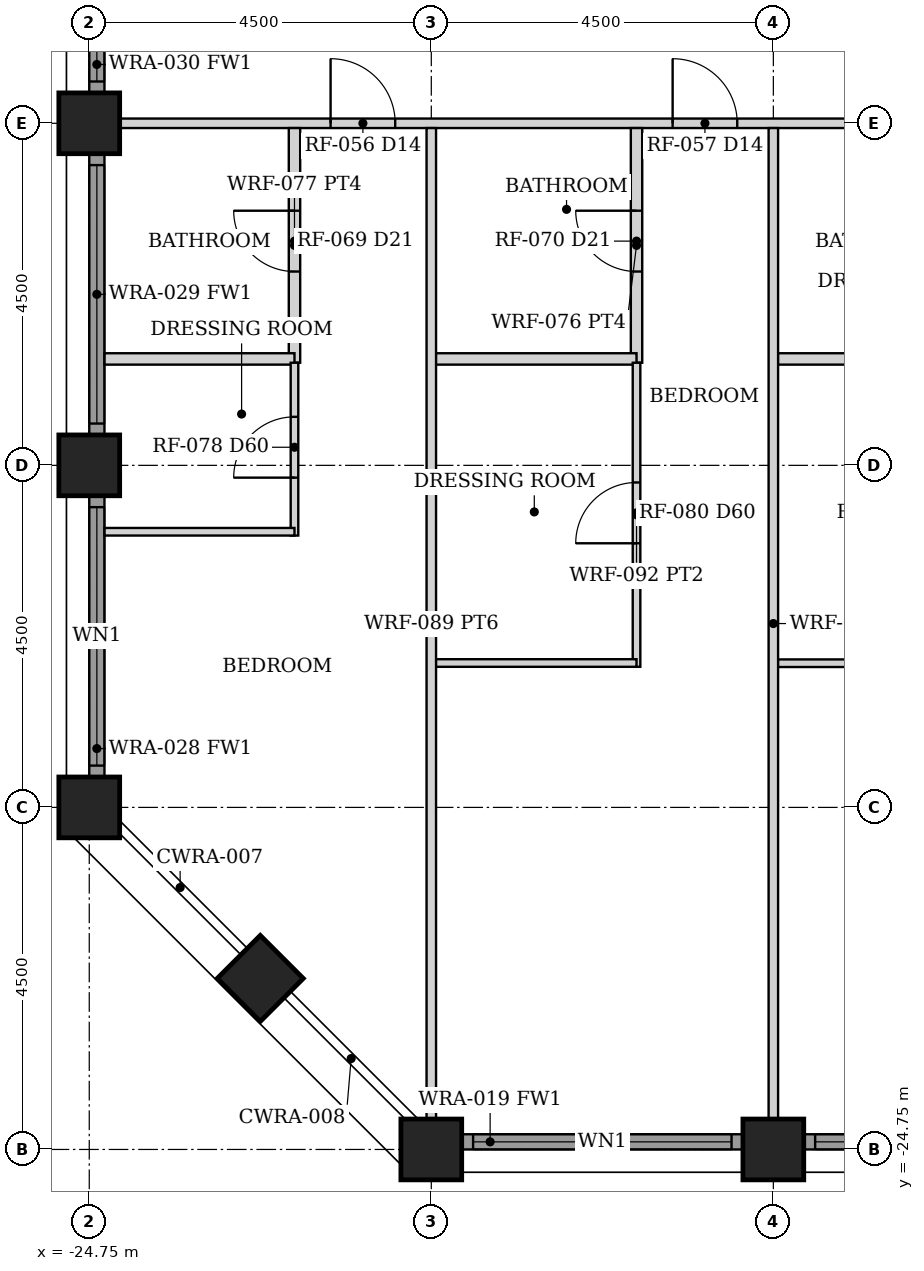
"""IFC4 building model, lengths in metres.
Left out: names, types, materials, properties, quantities, classifications, styles, units other than length and angle.
Written with IfcOpenShell. Run it as: python <this file> out.ifc"""

import sys

from ifc_helpers import new_model, si_unit, direction, frame, frame_2d, origin, origin_2d, place, context, subcontext, project, spatial, rectangle, hollow_rectangle, extrude, element, fill, save


model = new_model("IFC4")
c1 = context("Model", 3, precision=1e-05, world=origin(), true_north=direction((0.0, 1.0)))
c2 = subcontext(c1, "Body", "Model", "MODEL_VIEW")
j1 = project(units=[si_unit("LENGTHUNIT", "METRE"), si_unit("PLANEANGLEUNIT", "RADIAN")], contexts=[c1])
p1 = place(None, origin())
s1 = spatial("IfcSite", under=j1, at=p1, CompositionType="ELEMENT")
p2 = place(p1, origin())
s2 = spatial("IfcBuilding", under=s1, at=p2, CompositionType="ELEMENT")
p3 = place(p2, frame((0.0, 0.0, 79.0)))
s3 = spatial("IfcBuildingStorey", under=s2, at=p3, CompositionType="ELEMENT", Elevation=79.0)
for number, where, z_axis, x_axis in (
    (1, (-20.25, -24.75, 0.0), (0.0, 0.0, 1.0), (0.0, 1.0, 0.0)),
    (2, (-24.75, -20.25, 0.0), (0.0, 0.0, 1.0), (1.0, 0.0, 0.0)),
    (3, (-15.75, -24.75, 0.0), (0.0, 0.0, 1.0), (0.0, 1.0, 0.0)),
    (4, (-24.75, -15.75, 0.0), (0.0, 0.0, 1.0), (1.0, 0.0, 0.0)),
    (5, (-24.75, -11.25, 0.0), (0.0, 0.0, 1.0), (1.0, 0.0, 0.0)),
    (6, (-22.5, -22.5, 0.0), (0.0, 0.0, 1.0), (0.707, 0.707, 0.0)),
):
    element("IfcColumn", number, at=place(p3, frame(where, z_axis=z_axis, x_axis=x_axis)), inside=s3, PredefinedType="COLUMN", context=c2, shape_type="SweptSolid", body=[
        extrude(hollow_rectangle(XDim=0.8, YDim=0.8, WallThickness=0.06, at=origin_2d()), origin(), (0.0, 0.0, 1.0), 3.5),
    ])
p4 = place(p3, frame((-19.845, -24.65, 0.0), z_axis=(0.0, 0.0, 1.0), x_axis=(1.0, 0.0, 0.0)))
e7 = element("IfcWall", 7, at=p4, inside=s3, PredefinedType="SOLIDWALL", context=c2, shape_type="SweptSolid", body=[
    extrude(rectangle(XDim=3.69, YDim=0.2, at=frame_2d((1.845, 0.0))), origin(), (0.0, 0.0, 1.0), 2.379),
])
p5 = place(p4, frame((0.145, 0.0, 0.3)))
e8 = element("IfcOpeningElement", 8, at=p5, cuts=e7, PredefinedType="OPENING", context=c2, shape_type="SweptSolid", body=[
    extrude(rectangle(XDim=3.4, YDim=1.929, at=frame_2d((1.7, 0.964))), frame((0.0, 0.11, 0.0), z_axis=(0.0, -1.0, 0.0), x_axis=(1.0, 0.0, 0.0)), (0.0, 0.0, 1.0), 0.22),
])
p6 = place(p3, frame((-15.345, -24.65, 0.0), z_axis=(0.0, 0.0, 1.0), x_axis=(1.0, 0.0, 0.0)))
e9 = element("IfcWall", 9, at=p6, inside=s3, PredefinedType="SOLIDWALL", context=c2, shape_type="SweptSolid", body=[
    extrude(rectangle(XDim=3.69, YDim=0.2, at=frame_2d((1.845, 0.0))), origin(), (0.0, 0.0, 1.0), 2.379),
])
p7 = place(p6, frame((0.145, 0.0, 0.3)))
e10 = element("IfcOpeningElement", 10, at=p7, cuts=e9, PredefinedType="OPENING", context=c2, shape_type="SweptSolid", body=[
    extrude(rectangle(XDim=3.4, YDim=1.929, at=frame_2d((1.7, 0.964))), frame((0.0, 0.11, 0.0), z_axis=(0.0, -1.0, 0.0), x_axis=(1.0, 0.0, 0.0)), (0.0, 0.0, 1.0), 0.22),
])
p8 = place(p3, frame((-24.65, -19.845, 0.0), z_axis=(0.0, 0.0, 1.0), x_axis=(0.0, 1.0, 0.0)))
e11 = element("IfcWall", 11, at=p8, inside=s3, PredefinedType="SOLIDWALL", context=c2, shape_type="SweptSolid", body=[
    extrude(rectangle(XDim=3.69, YDim=0.2, at=frame_2d((1.845, 0.0))), origin(), (0.0, 0.0, 1.0), 2.379),
])
p9 = place(p8, frame((0.145, 0.0, 0.3)))
e12 = element("IfcOpeningElement", 12, at=p9, cuts=e11, PredefinedType="OPENING", context=c2, shape_type="SweptSolid", body=[
    extrude(rectangle(XDim=3.4, YDim=1.929, at=frame_2d((1.7, 0.964))), frame((0.0, 0.11, 0.0), z_axis=(0.0, -1.0, 0.0), x_axis=(1.0, 0.0, 0.0)), (0.0, 0.0, 1.0), 0.22),
])
p10 = place(p3, frame((-24.65, -15.345, 0.0), z_axis=(0.0, 0.0, 1.0), x_axis=(0.0, 1.0, 0.0)))
e13 = element("IfcWall", 13, at=p10, inside=s3, PredefinedType="SOLIDWALL", context=c2, shape_type="SweptSolid", body=[
    extrude(rectangle(XDim=3.69, YDim=0.2, at=frame_2d((1.845, 0.0))), origin(), (0.0, 0.0, 1.0), 2.379),
])
p11 = place(p10, frame((0.145, 0.0, 0.3)))
e14 = element("IfcOpeningElement", 14, at=p11, cuts=e13, PredefinedType="OPENING", context=c2, shape_type="SweptSolid", body=[
    extrude(rectangle(XDim=3.4, YDim=1.929, at=frame_2d((1.7, 0.964))), frame((0.0, 0.11, 0.0), z_axis=(0.0, -1.0, 0.0), x_axis=(1.0, 0.0, 0.0)), (0.0, 0.0, 1.0), 0.22),
])
p12 = place(p3, frame((-24.65, -10.845, 0.0), z_axis=(0.0, 0.0, 1.0), x_axis=(0.0, 1.0, 0.0)))
e15 = element("IfcWall", 15, at=p12, inside=s3, PredefinedType="SOLIDWALL", context=c2, shape_type="SweptSolid", body=[
    extrude(rectangle(XDim=3.69, YDim=0.2, at=frame_2d((1.845, 0.0))), origin(), (0.0, 0.0, 1.0), 2.379),
])
p13 = place(p12, frame((0.145, 0.0, 0.3)))
e16 = element("IfcOpeningElement", 16, at=p13, cuts=e15, PredefinedType="OPENING", context=c2, shape_type="SweptSolid", body=[
    extrude(rectangle(XDim=3.4, YDim=1.929, at=frame_2d((1.7, 0.964))), frame((0.0, 0.11, 0.0), z_axis=(0.0, -1.0, 0.0), x_axis=(1.0, 0.0, 0.0)), (0.0, 0.0, 1.0), 0.22),
])
p14 = place(p3, frame((-24.35, -11.25, 0.0), z_axis=(0.0, 0.0, 1.0), x_axis=(1.0, 0.0, 0.0)))
e17 = element("IfcWall", 17, at=p14, inside=s3, PredefinedType="PARTITIONING", context=c2, shape_type="SweptSolid", body=[
    extrude(rectangle(XDim=26.5, YDim=0.125, at=frame_2d((13.25, 0.0))), origin(), (0.0, 0.0, 1.0), 2.373),
])
p15 = place(p14, frame((24.75, 0.0, 0.0)))
e18 = element("IfcOpeningElement", 18, at=p15, cuts=e17, PredefinedType="OPENING", context=c2, shape_type="SweptSolid", body=[
    extrude(rectangle(XDim=0.9, YDim=2.1, at=frame_2d((0.45, 1.05))), frame((0.0, 0.073, 0.0), z_axis=(0.0, -1.0, 0.0), x_axis=(1.0, 0.0, 0.0)), (0.0, 0.0, 1.0), 0.145),
])
p16 = place(p14, frame((19.15, 0.0, 0.0)))
e19 = element("IfcOpeningElement", 19, at=p16, cuts=e17, PredefinedType="OPENING", context=c2, shape_type="SweptSolid", body=[
    extrude(rectangle(XDim=1.4, YDim=2.1, at=frame_2d((0.7, 1.05))), frame((0.0, 0.073, 0.0), z_axis=(0.0, -1.0, 0.0), x_axis=(1.0, 0.0, 0.0)), (0.0, 0.0, 1.0), 0.145),
])
p17 = place(p14, frame((16.275, 0.0, 0.0)))
e20 = element("IfcOpeningElement", 20, at=p17, cuts=e17, PredefinedType="OPENING", context=c2, shape_type="SweptSolid", body=[
    extrude(rectangle(XDim=0.85, YDim=2.1, at=frame_2d((0.425, 1.05))), frame((0.0, 0.073, 0.0), z_axis=(0.0, -1.0, 0.0), x_axis=(1.0, 0.0, 0.0)), (0.0, 0.0, 1.0), 0.145),
])
p18 = place(p14, frame((14.03, 0.0, 0.0)))
e21 = element("IfcOpeningElement", 21, at=p18, cuts=e17, PredefinedType="OPENING", context=c2, shape_type="SweptSolid", body=[
    extrude(rectangle(XDim=0.9, YDim=2.1, at=frame_2d((0.45, 1.05))), frame((0.0, 0.073, 0.0), z_axis=(0.0, -1.0, 0.0), x_axis=(1.0, 0.0, 0.0)), (0.0, 0.0, 1.0), 0.145),
])
p19 = place(p14, frame((11.775, 0.0, 0.0)))
e22 = element("IfcOpeningElement", 22, at=p19, cuts=e17, PredefinedType="OPENING", context=c2, shape_type="SweptSolid", body=[
    extrude(rectangle(XDim=0.85, YDim=2.1, at=frame_2d((0.425, 1.05))), frame((0.0, 0.073, 0.0), z_axis=(0.0, -1.0, 0.0), x_axis=(1.0, 0.0, 0.0)), (0.0, 0.0, 1.0), 0.145),
])
p20 = place(p14, frame((7.275, 0.0, 0.0)))
e23 = element("IfcOpeningElement", 23, at=p20, cuts=e17, PredefinedType="OPENING", context=c2, shape_type="SweptSolid", body=[
    extrude(rectangle(XDim=0.85, YDim=2.1, at=frame_2d((0.425, 1.05))), frame((0.0, 0.073, 0.0), z_axis=(0.0, -1.0, 0.0), x_axis=(1.0, 0.0, 0.0)), (0.0, 0.0, 1.0), 0.145),
])
p21 = place(p14, frame((2.775, 0.0, 0.0)))
e24 = element("IfcOpeningElement", 24, at=p21, cuts=e17, PredefinedType="OPENING", context=c2, shape_type="SweptSolid", body=[
    extrude(rectangle(XDim=0.85, YDim=2.1, at=frame_2d((0.425, 1.05))), frame((0.0, 0.073, 0.0), z_axis=(0.0, -1.0, 0.0), x_axis=(1.0, 0.0, 0.0)), (0.0, 0.0, 1.0), 0.145),
])
p22 = place(p3, frame((-15.69, -14.35, 0.0), z_axis=(0.0, 0.0, 1.0), x_axis=(1.0, 0.0, 0.0)))
e25 = element("IfcWall", 25, at=p22, inside=s3, PredefinedType="PARTITIONING", context=c2, shape_type="SweptSolid", body=[
    extrude(rectangle(XDim=2.64, YDim=0.15, at=frame_2d((1.32, 0.0))), origin(), (0.0, 0.0, 1.0), 2.373),
])
p23 = place(p3, frame((-15.69, -18.353, 0.0), z_axis=(0.0, 0.0, 1.0), x_axis=(1.0, 0.0, 0.0)))
e26 = element("IfcWall", 26, at=p23, inside=s3, PredefinedType="PARTITIONING", context=c2, shape_type="SweptSolid", body=[
    extrude(rectangle(XDim=2.64, YDim=0.1, at=frame_2d((1.32, 0.0))), origin(), (0.0, 0.0, 1.0), 2.373),
])
p24 = place(p3, frame((-15.75, -24.35, 0.0), z_axis=(0.0, 0.0, 1.0), x_axis=(0.0, 1.0, 0.0)))
e27 = element("IfcWall", 27, at=p24, inside=s3, PredefinedType="PARTITIONING", context=c2, shape_type="SweptSolid", body=[
    extrude(rectangle(XDim=13.038, YDim=0.125, at=frame_2d((6.519, 0.0))), origin(), (0.0, 0.0, 1.0), 2.373),
])
p25 = place(p3, frame((-17.55, -14.4, 0.0), z_axis=(0.0, 0.0, 1.0), x_axis=(0.0, 1.0, 0.0)))
e28 = element("IfcWall", 28, at=p25, inside=s3, PredefinedType="PARTITIONING", context=c2, shape_type="SweptSolid", body=[
    extrude(rectangle(XDim=3.087, YDim=0.15, at=frame_2d((1.544, 0.0))), origin(), (0.0, 0.0, 1.0), 2.373),
])
p26 = place(p25, frame((1.2, 0.0, 0.0)))
e29 = element("IfcOpeningElement", 29, at=p26, cuts=e28, PredefinedType="OPENING", context=c2, shape_type="SweptSolid", body=[
    extrude(rectangle(XDim=0.8, YDim=2.1, at=frame_2d((0.4, 1.05))), frame((0.0, 0.085, 0.0), z_axis=(0.0, -1.0, 0.0), x_axis=(1.0, 0.0, 0.0)), (0.0, 0.0, 1.0), 0.17),
])
p27 = place(p3, frame((-20.19, -14.35, 0.0), z_axis=(0.0, 0.0, 1.0), x_axis=(1.0, 0.0, 0.0)))
e30 = element("IfcWall", 30, at=p27, inside=s3, PredefinedType="PARTITIONING", context=c2, shape_type="SweptSolid", body=[
    extrude(rectangle(XDim=2.64, YDim=0.15, at=frame_2d((1.32, 0.0))), origin(), (0.0, 0.0, 1.0), 2.373),
])
p28 = place(p3, frame((-17.55, -18.4, 0.0), z_axis=(0.0, 0.0, 1.0), x_axis=(0.0, 1.0, 0.0)))
e31 = element("IfcWall", 31, at=p28, inside=s3, PredefinedType="PARTITIONING", context=c2, shape_type="SweptSolid", body=[
    extrude(rectangle(XDim=4.0, YDim=0.1, at=frame_2d((2.0, 0.0))), origin(), (0.0, 0.0, 1.0), 2.373),
])
p29 = place(p28, frame((1.625, 0.0, 0.0)))
e32 = element("IfcOpeningElement", 32, at=p29, cuts=e31, PredefinedType="OPENING", context=c2, shape_type="SweptSolid", body=[
    extrude(rectangle(XDim=0.8, YDim=2.1, at=frame_2d((0.4, 1.05))), frame((0.0, 0.06, 0.0), z_axis=(0.0, -1.0, 0.0), x_axis=(1.0, 0.0, 0.0)), (0.0, 0.0, 1.0), 0.12),
])
p30 = place(p3, frame((-20.19, -18.35, 0.0), z_axis=(0.0, 0.0, 1.0), x_axis=(1.0, 0.0, 0.0)))
e33 = element("IfcWall", 33, at=p30, inside=s3, PredefinedType="PARTITIONING", context=c2, shape_type="SweptSolid", body=[
    extrude(rectangle(XDim=2.64, YDim=0.1, at=frame_2d((1.32, 0.0))), origin(), (0.0, 0.0, 1.0), 2.373),
])
p31 = place(p3, frame((-20.25, -24.35, 0.0), z_axis=(0.0, 0.0, 1.0), x_axis=(0.0, 1.0, 0.0)))
e34 = element("IfcWall", 34, at=p31, inside=s3, PredefinedType="PARTITIONING", context=c2, shape_type="SweptSolid", body=[
    extrude(rectangle(XDim=13.038, YDim=0.125, at=frame_2d((6.519, 0.0))), origin(), (0.0, 0.0, 1.0), 2.373),
])
p32 = place(p3, frame((-22.05, -14.4, 0.0), z_axis=(0.0, 0.0, 1.0), x_axis=(0.0, 1.0, 0.0)))
e35 = element("IfcWall", 35, at=p32, inside=s3, PredefinedType="PARTITIONING", context=c2, shape_type="SweptSolid", body=[
    extrude(rectangle(XDim=3.087, YDim=0.15, at=frame_2d((1.544, 0.0))), origin(), (0.0, 0.0, 1.0), 2.373),
])
p33 = place(p32, frame((1.2, 0.0, 0.0)))
e36 = element("IfcOpeningElement", 36, at=p33, cuts=e35, PredefinedType="OPENING", context=c2, shape_type="SweptSolid", body=[
    extrude(rectangle(XDim=0.8, YDim=2.1, at=frame_2d((0.4, 1.05))), frame((0.0, 0.085, 0.0), z_axis=(0.0, -1.0, 0.0), x_axis=(1.0, 0.0, 0.0)), (0.0, 0.0, 1.0), 0.17),
])
p34 = place(p3, frame((-24.55, -14.35, 0.0), z_axis=(0.0, 0.0, 1.0), x_axis=(1.0, 0.0, 0.0)))
e37 = element("IfcWall", 37, at=p34, inside=s3, PredefinedType="PARTITIONING", context=c2, shape_type="SweptSolid", body=[
    extrude(rectangle(XDim=2.5, YDim=0.15, at=frame_2d((1.25, 0.0))), origin(), (0.0, 0.0, 1.0), 2.373),
])
p35 = place(p3, frame((-22.05, -16.674, 0.0), z_axis=(0.0, 0.0, 1.0), x_axis=(0.0, 1.0, 0.0)))
e38 = element("IfcWall", 38, at=p35, inside=s3, PredefinedType="PARTITIONING", context=c2, shape_type="SweptSolid", body=[
    extrude(rectangle(XDim=2.274, YDim=0.1, at=frame_2d((1.137, 0.0))), origin(), (0.0, 0.0, 1.0), 2.373),
])
p36 = place(p35, frame((0.762, 0.0, 0.0)))
e39 = element("IfcOpeningElement", 39, at=p36, cuts=e38, PredefinedType="OPENING", context=c2, shape_type="SweptSolid", body=[
    extrude(rectangle(XDim=0.8, YDim=2.1, at=frame_2d((0.4, 1.05))), frame((0.0, 0.06, 0.0), z_axis=(0.0, -1.0, 0.0), x_axis=(1.0, 0.0, 0.0)), (0.0, 0.0, 1.0), 0.12),
])
p37 = place(p3, frame((-24.55, -16.624, 0.0), z_axis=(0.0, 0.0, 1.0), x_axis=(1.0, 0.0, 0.0)))
e40 = element("IfcWall", 40, at=p37, inside=s3, PredefinedType="PARTITIONING", context=c2, shape_type="SweptSolid", body=[
    extrude(rectangle(XDim=2.5, YDim=0.1, at=frame_2d((1.25, 0.0))), origin(), (0.0, 0.0, 1.0), 2.373),
])
p38 = place(p5, origin())
e41 = element("IfcWindow", 41, at=p38, inside=s3, PartitioningType="SINGLE_PANEL", PredefinedType="WINDOW", context=c2, shape_type="SweptSolid", body=[
    extrude(rectangle(XDim=3.4, YDim=1.929, at=frame_2d((1.7, 0.964))), frame((0.0, 0.03, 0.0), z_axis=(0.0, -1.0, 0.0), x_axis=(1.0, 0.0, 0.0)), (0.0, 0.0, 1.0), 0.06),
])
fill(e8, e41)
p39 = place(p7, origin())
e42 = element("IfcWindow", 42, at=p39, inside=s3, PartitioningType="SINGLE_PANEL", PredefinedType="WINDOW", context=c2, shape_type="SweptSolid", body=[
    extrude(rectangle(XDim=3.4, YDim=1.929, at=frame_2d((1.7, 0.964))), frame((0.0, 0.03, 0.0), z_axis=(0.0, -1.0, 0.0), x_axis=(1.0, 0.0, 0.0)), (0.0, 0.0, 1.0), 0.06),
])
fill(e10, e42)
p40 = place(p9, origin())
e43 = element("IfcWindow", 43, at=p40, inside=s3, PartitioningType="SINGLE_PANEL", PredefinedType="WINDOW", context=c2, shape_type="SweptSolid", body=[
    extrude(rectangle(XDim=3.4, YDim=1.929, at=frame_2d((1.7, 0.964))), frame((0.0, 0.03, 0.0), z_axis=(0.0, -1.0, 0.0), x_axis=(1.0, 0.0, 0.0)), (0.0, 0.0, 1.0), 0.06),
])
fill(e12, e43)
p41 = place(p11, origin())
e44 = element("IfcWindow", 44, at=p41, inside=s3, PartitioningType="SINGLE_PANEL", PredefinedType="WINDOW", context=c2, shape_type="SweptSolid", body=[
    extrude(rectangle(XDim=3.4, YDim=1.929, at=frame_2d((1.7, 0.964))), frame((0.0, 0.03, 0.0), z_axis=(0.0, -1.0, 0.0), x_axis=(1.0, 0.0, 0.0)), (0.0, 0.0, 1.0), 0.06),
])
fill(e14, e44)
p42 = place(p13, origin())
e45 = element("IfcWindow", 45, at=p42, inside=s3, PartitioningType="SINGLE_PANEL", PredefinedType="WINDOW", context=c2, shape_type="SweptSolid", body=[
    extrude(rectangle(XDim=3.4, YDim=1.929, at=frame_2d((1.7, 0.964))), frame((0.0, 0.03, 0.0), z_axis=(0.0, -1.0, 0.0), x_axis=(1.0, 0.0, 0.0)), (0.0, 0.0, 1.0), 0.06),
])
fill(e16, e45)
p43 = place(p20, origin())
e46 = element("IfcDoor", 46, at=p43, inside=s3, OperationType="SINGLE_SWING_LEFT", PredefinedType="DOOR", context=c2, shape_type="SweptSolid", body=[
    extrude(rectangle(XDim=0.85, YDim=2.1, at=frame_2d((0.425, 1.05))), frame((0.0, 0.025, 0.0), z_axis=(0.0, -1.0, 0.0), x_axis=(1.0, 0.0, 0.0)), (0.0, 0.0, 1.0), 0.05),
])
fill(e23, e46)
p44 = place(p26, origin())
e47 = element("IfcDoor", 47, at=p44, inside=s3, OperationType="SINGLE_SWING_RIGHT", PredefinedType="DOOR", context=c2, shape_type="SweptSolid", body=[
    extrude(rectangle(XDim=0.8, YDim=2.1, at=frame_2d((0.4, 1.05))), frame((0.0, 0.025, 0.0), z_axis=(0.0, -1.0, 0.0), x_axis=(1.0, 0.0, 0.0)), (0.0, 0.0, 1.0), 0.05),
])
fill(e29, e47)
p45 = place(p29, origin())
e48 = element("IfcDoor", 48, at=p45, inside=s3, OperationType="SINGLE_SWING_LEFT", PredefinedType="DOOR", context=c2, shape_type="SweptSolid", body=[
    extrude(rectangle(XDim=0.8, YDim=2.1, at=frame_2d((0.4, 1.05))), frame((0.0, 0.025, 0.0), z_axis=(0.0, -1.0, 0.0), x_axis=(1.0, 0.0, 0.0)), (0.0, 0.0, 1.0), 0.05),
])
fill(e32, e48)
p46 = place(p21, origin())
e49 = element("IfcDoor", 49, at=p46, inside=s3, OperationType="SINGLE_SWING_LEFT", PredefinedType="DOOR", context=c2, shape_type="SweptSolid", body=[
    extrude(rectangle(XDim=0.85, YDim=2.1, at=frame_2d((0.425, 1.05))), frame((0.0, 0.025, 0.0), z_axis=(0.0, -1.0, 0.0), x_axis=(1.0, 0.0, 0.0)), (0.0, 0.0, 1.0), 0.05),
])
fill(e24, e49)
p47 = place(p33, origin())
e50 = element("IfcDoor", 50, at=p47, inside=s3, OperationType="SINGLE_SWING_RIGHT", PredefinedType="DOOR", context=c2, shape_type="SweptSolid", body=[
    extrude(rectangle(XDim=0.8, YDim=2.1, at=frame_2d((0.4, 1.05))), frame((0.0, 0.025, 0.0), z_axis=(0.0, -1.0, 0.0), x_axis=(1.0, 0.0, 0.0)), (0.0, 0.0, 1.0), 0.05),
])
fill(e36, e50)
p48 = place(p36, origin())
e51 = element("IfcDoor", 51, at=p48, inside=s3, OperationType="SINGLE_SWING_LEFT", PredefinedType="DOOR", context=c2, shape_type="SweptSolid", body=[
    extrude(rectangle(XDim=0.8, YDim=2.1, at=frame_2d((0.4, 1.05))), frame((0.0, 0.025, 0.0), z_axis=(0.0, -1.0, 0.0), x_axis=(1.0, 0.0, 0.0)), (0.0, 0.0, 1.0), 0.05),
])
fill(e39, e51)
save(model, sys.argv[1])
